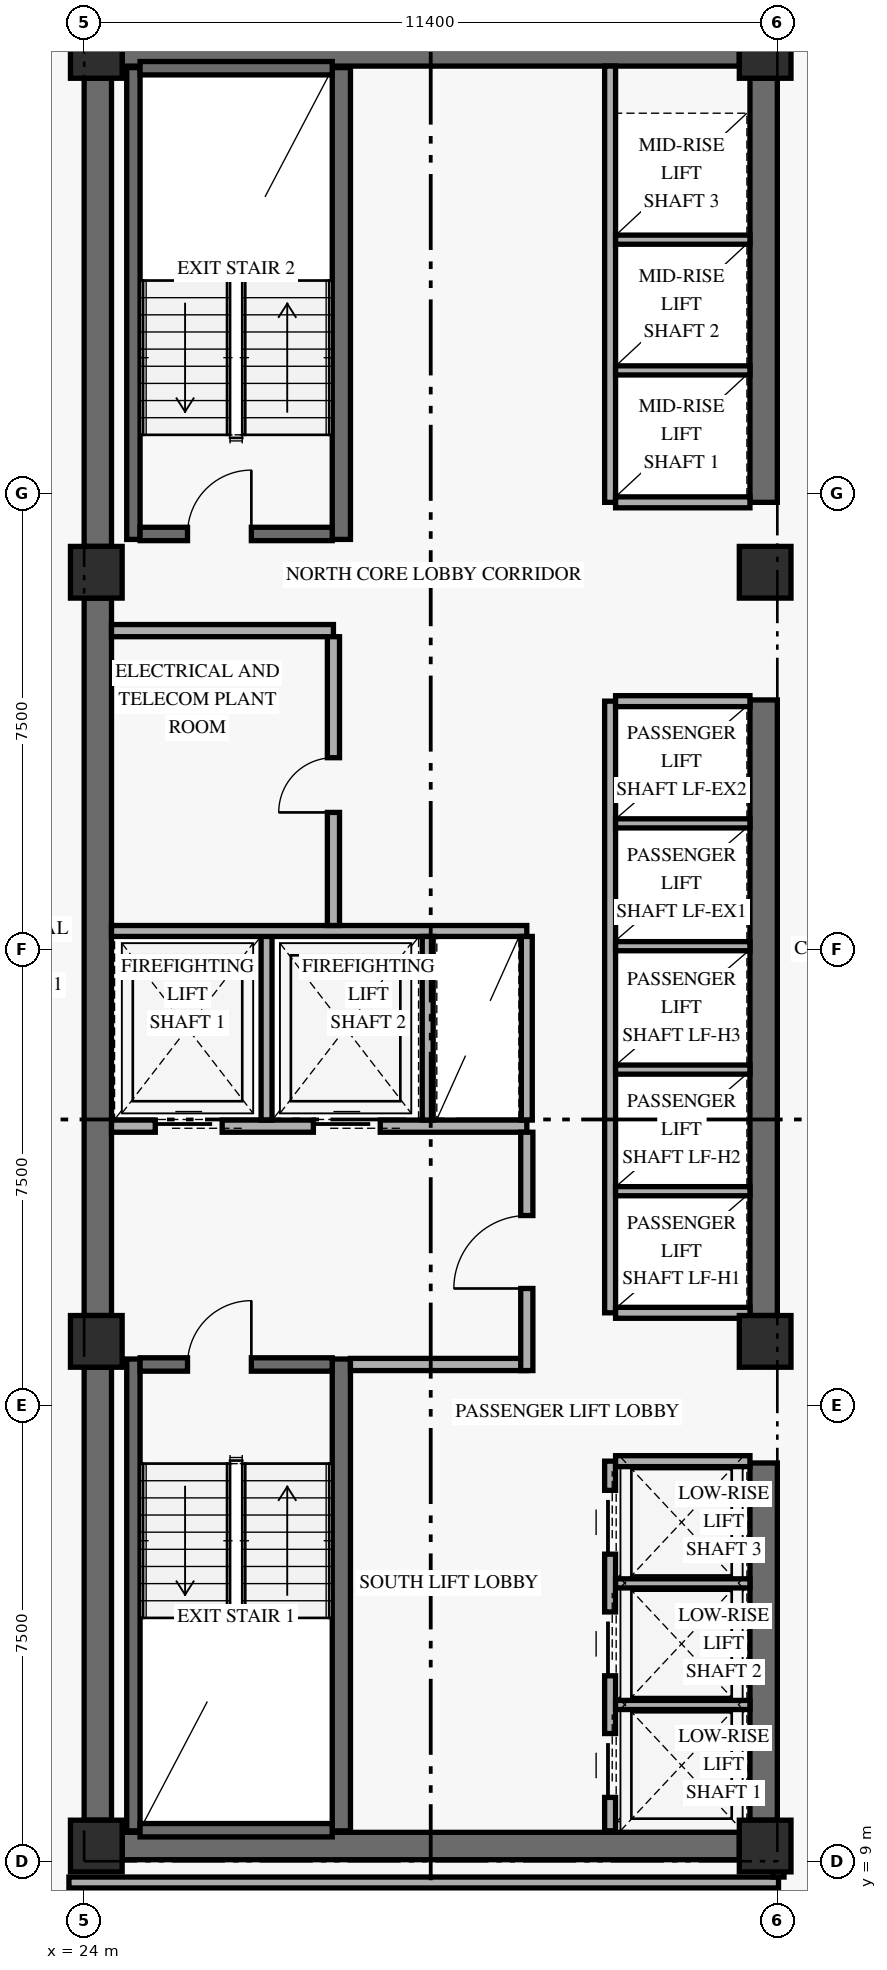
"""IFC4 building model, lengths in metres.
Left out: names, types, materials, properties, quantities, classifications, styles, units other than length and angle.
Written with IfcOpenShell. Run it as: python <this file> out.ifc"""

import sys

from ifc_helpers import new_model, si_unit, direction, frame, frame_2d, origin, origin_2d, place, context, subcontext, project, spatial, rectangle, extrude, element, fill, save


model = new_model("IFC4")
c1 = context("Model", 3, precision=1e-05, world=origin(), true_north=direction((0.0, 1.0)))
c2 = subcontext(c1, "Body", "Model", "MODEL_VIEW")
j1 = project(units=[si_unit("LENGTHUNIT", "METRE"), si_unit("PLANEANGLEUNIT", "RADIAN")], contexts=[c1])
p1 = place(None, origin())
s1 = spatial("IfcSite", under=j1, at=p1, CompositionType="ELEMENT")
p2 = place(p1, origin())
s2 = spatial("IfcBuilding", under=s1, at=p2, CompositionType="ELEMENT")
p3 = place(p2, frame((0.0, 0.0, 24.0)))
s3 = spatial("IfcBuildingStorey", under=s2, at=p3, CompositionType="ELEMENT", Elevation=24.0)
p4 = place(p3, frame((24.225, 9.675, 0.0), z_axis=(0.0, 0.0, 1.0), x_axis=(0.0, 1.0, 0.0)))
e1 = element("IfcWall", 1, at=p4, inside=s3, PredefinedType="SHEAR", context=c2, shape_type="SweptSolid", body=[
    extrude(rectangle(XDim=7.45, YDim=0.45, at=frame_2d((3.725, 0.0))), origin(), (0.0, 0.0, 1.0), 2.667),
])
p5 = place(p3, frame((24.225, 17.975, 0.0), z_axis=(0.0, 0.0, 1.0), x_axis=(0.0, 1.0, 0.0)))
e2 = element("IfcWall", 2, at=p5, inside=s3, PredefinedType="SHEAR", context=c2, shape_type="SweptSolid", body=[
    extrude(rectangle(XDim=11.8, YDim=0.45, at=frame_2d((5.9, 0.0))), origin(), (0.0, 0.0, 1.0), 2.667),
])
p6 = place(p3, frame((24.225, 30.625, 0.0), z_axis=(0.0, 0.0, 1.0), x_axis=(0.0, 1.0, 0.0)))
e3 = element("IfcWall", 3, at=p6, inside=s3, PredefinedType="SHEAR", context=c2, shape_type="SweptSolid", body=[
    extrude(rectangle(XDim=7.7, YDim=0.45, at=frame_2d((3.85, 0.0))), origin(), (0.0, 0.0, 1.0), 2.667),
])
p7 = place(p3, frame((35.175, 9.675, 0.0), z_axis=(0.0, 0.0, 1.0), x_axis=(0.0, 1.0, 0.0)))
e4 = element("IfcWall", 4, at=p7, inside=s3, PredefinedType="SHEAR", context=c2, shape_type="SweptSolid", body=[
    extrude(rectangle(XDim=5.875, YDim=0.45, at=frame_2d((2.938, 0.0))), origin(), (0.0, 0.0, 1.0), 2.667),
])
p8 = place(p3, frame((35.175, 17.975, 0.0), z_axis=(0.0, 0.0, 1.0), x_axis=(0.0, 1.0, 0.0)))
e5 = element("IfcWall", 5, at=p8, inside=s3, PredefinedType="SHEAR", context=c2, shape_type="SweptSolid", body=[
    extrude(rectangle(XDim=10.125, YDim=0.45, at=frame_2d((5.062, 0.0))), origin(), (0.0, 0.0, 1.0), 2.667),
])
p9 = place(p3, frame((35.175, 31.35, 0.0), z_axis=(0.0, 0.0, 1.0), x_axis=(0.0, 1.0, 0.0)))
e6 = element("IfcWall", 6, at=p9, inside=s3, PredefinedType="SHEAR", context=c2, shape_type="SweptSolid", body=[
    extrude(rectangle(XDim=6.975, YDim=0.45, at=frame_2d((3.487, 0.0))), origin(), (0.0, 0.0, 1.0), 2.667),
])
for number, where, z_axis, x_axis in (
    (7, (24.625, 9.25, 0.0), (0.0, 0.0, 1.0), (1.0, 0.0, 0.0)),
    (8, (24.625, 38.75, 0.0), (0.0, 0.0, 1.0), (1.0, 0.0, 0.0)),
):
    element("IfcWall", number, at=place(p3, frame(where, z_axis=z_axis, x_axis=x_axis)), inside=s3, PredefinedType="SHEAR", context=c2, shape_type="SweptSolid", body=[
        extrude(rectangle(XDim=10.15, YDim=0.45, at=frame_2d((5.075, 0.0))), origin(), (0.0, 0.0, 1.0), 3.36),
    ])
p10 = place(p3, frame((24.81, 9.5, 0.0), z_axis=(0.0, 0.0, 1.0), x_axis=(0.0, 1.0, 0.0)))
e9 = element("IfcWall", 9, at=p10, inside=s3, PredefinedType="SHEAR", context=c2, shape_type="SweptSolid", body=[
    extrude(rectangle(XDim=7.76, YDim=0.22, at=frame_2d((3.88, 0.0))), origin(), (0.0, 0.0, 1.0), 3.36),
])
p11 = place(p3, frame((28.23, 9.5, 0.0), z_axis=(0.0, 0.0, 1.0), x_axis=(0.0, 1.0, 0.0)))
e10 = element("IfcWall", 10, at=p11, inside=s3, PredefinedType="SHEAR", context=c2, shape_type="SweptSolid", body=[
    extrude(rectangle(XDim=7.76, YDim=0.3, at=frame_2d((3.88, 0.0))), origin(), (0.0, 0.0, 1.0), 3.36),
])
p12 = place(p3, frame((24.92, 9.51, 0.0), z_axis=(0.0, 0.0, 1.0), x_axis=(1.0, 0.0, 0.0)))
e11 = element("IfcWall", 11, at=p12, inside=s3, PredefinedType="SHEAR", context=c2, shape_type="SweptSolid", body=[
    extrude(rectangle(XDim=3.16, YDim=0.22, at=frame_2d((1.58, 0.0))), origin(), (0.0, 0.0, 1.0), 3.36),
])
p13 = place(p3, frame((24.92, 17.17, 0.0), z_axis=(0.0, 0.0, 1.0), x_axis=(1.0, 0.0, 0.0)))
e12 = element("IfcWall", 12, at=p13, inside=s3, PredefinedType="SHEAR", context=c2, shape_type="SweptSolid", body=[
    extrude(rectangle(XDim=3.16, YDim=0.22, at=frame_2d((1.58, 0.0))), origin(), (0.0, 0.0, 1.0), 3.36),
])
p14 = place(p13, frame((0.78, 0.0, 0.0)))
e13 = element("IfcOpeningElement", 13, at=p14, cuts=e12, PredefinedType="OPENING", context=c2, shape_type="SweptSolid", body=[
    extrude(rectangle(XDim=1.05, YDim=2.15, at=frame_2d((0.525, 1.075))), frame((0.0, 0.12, 0.0), z_axis=(0.0, -1.0, 0.0), x_axis=(1.0, 0.0, 0.0)), (0.0, 0.0, 1.0), 0.24),
])
p15 = place(p3, frame((24.81, 30.74, 0.0), z_axis=(0.0, 0.0, 1.0), x_axis=(0.0, 1.0, 0.0)))
e14 = element("IfcWall", 14, at=p15, inside=s3, PredefinedType="SHEAR", context=c2, shape_type="SweptSolid", body=[
    extrude(rectangle(XDim=7.76, YDim=0.22, at=frame_2d((3.88, 0.0))), origin(), (0.0, 0.0, 1.0), 3.36),
])
p16 = place(p3, frame((28.23, 30.74, 0.0), z_axis=(0.0, 0.0, 1.0), x_axis=(0.0, 1.0, 0.0)))
e15 = element("IfcWall", 15, at=p16, inside=s3, PredefinedType="SHEAR", context=c2, shape_type="SweptSolid", body=[
    extrude(rectangle(XDim=7.76, YDim=0.3, at=frame_2d((3.88, 0.0))), origin(), (0.0, 0.0, 1.0), 3.36),
])
p17 = place(p3, frame((24.92, 30.83, 0.0), z_axis=(0.0, 0.0, 1.0), x_axis=(1.0, 0.0, 0.0)))
e16 = element("IfcWall", 16, at=p17, inside=s3, PredefinedType="SHEAR", context=c2, shape_type="SweptSolid", body=[
    extrude(rectangle(XDim=3.16, YDim=0.22, at=frame_2d((1.58, 0.0))), origin(), (0.0, 0.0, 1.0), 3.36),
])
p18 = place(p17, frame((0.78, 0.0, 0.0)))
e17 = element("IfcOpeningElement", 17, at=p18, cuts=e16, PredefinedType="OPENING", context=c2, shape_type="SweptSolid", body=[
    extrude(rectangle(XDim=1.05, YDim=2.15, at=frame_2d((0.525, 1.075))), frame((0.0, 0.12, 0.0), z_axis=(0.0, -1.0, 0.0), x_axis=(1.0, 0.0, 0.0)), (0.0, 0.0, 1.0), 0.24),
])
p19 = place(p3, frame((24.92, 38.49, 0.0), z_axis=(0.0, 0.0, 1.0), x_axis=(1.0, 0.0, 0.0)))
e18 = element("IfcWall", 18, at=p19, inside=s3, PredefinedType="SHEAR", context=c2, shape_type="SweptSolid", body=[
    extrude(rectangle(XDim=3.16, YDim=0.22, at=frame_2d((1.58, 0.0))), origin(), (0.0, 0.0, 1.0), 3.36),
])
for number, where, z_axis, x_axis in (
    (19, (24.2, 9.25, 0.0), (0.0, 0.0, 1.0), (1.0, 0.0, 0.0)),
    (20, (24.2, 17.55, 0.0), (0.0, 0.0, 1.0), (1.0, 0.0, 0.0)),
    (21, (24.2, 30.2, 0.0), (0.0, 0.0, 1.0), (1.0, 0.0, 0.0)),
    (22, (24.2, 38.75, 0.0), (0.0, 0.0, 1.0), (1.0, 0.0, 0.0)),
    (23, (35.2, 9.25, 0.0), (0.0, 0.0, 1.0), (1.0, 0.0, 0.0)),
    (24, (35.2, 17.55, 0.0), (0.0, 0.0, 1.0), (1.0, 0.0, 0.0)),
    (25, (35.2, 30.2, 0.0), (0.0, 0.0, 1.0), (1.0, 0.0, 0.0)),
    (26, (35.2, 38.75, 0.0), (0.0, 0.0, 1.0), (1.0, 0.0, 0.0)),
):
    element("IfcColumn", number, at=place(p3, frame(where, z_axis=z_axis, x_axis=x_axis)), inside=s3, PredefinedType="COLUMN", context=c2, shape_type="SweptSolid", body=[
        extrude(rectangle(XDim=0.85, YDim=0.85, at=origin_2d()), origin(), (0.0, 0.0, 1.0), 3.6),
    ])
p20 = place(p3, frame((24.45, 21.09, 0.0), z_axis=(0.0, 0.0, 1.0), x_axis=(1.0, 0.0, 0.0)))
e27 = element("IfcWall", 27, at=p20, inside=s3, PredefinedType="STANDARD", context=c2, shape_type="SweptSolid", body=[
    extrude(rectangle(XDim=6.83, YDim=0.2, at=frame_2d((3.415, 0.0))), origin(), (0.0, 0.0, 1.0), 3.36),
])
p21 = place(p20, frame((0.72, 0.0, 0.0)))
e28 = element("IfcOpeningElement", 28, at=p21, cuts=e27, PredefinedType="OPENING", context=c2, shape_type="SweptSolid", body=[
    extrude(rectangle(XDim=1.1, YDim=2.2, at=frame_2d((0.55, 1.1))), frame((0.0, 0.11, 0.0), z_axis=(0.0, -1.0, 0.0), x_axis=(1.0, 0.0, 0.0)), (0.0, 0.0, 1.0), 0.22),
])
p22 = place(p20, frame((3.32, 0.0, 0.0)))
e29 = element("IfcOpeningElement", 29, at=p22, cuts=e27, PredefinedType="OPENING", context=c2, shape_type="SweptSolid", body=[
    extrude(rectangle(XDim=1.1, YDim=2.2, at=frame_2d((0.55, 1.1))), frame((0.0, 0.11, 0.0), z_axis=(0.0, -1.0, 0.0), x_axis=(1.0, 0.0, 0.0)), (0.0, 0.0, 1.0), 0.22),
])
p23 = place(p3, frame((28.38, 17.17, 0.0), z_axis=(0.0, 0.0, 1.0), x_axis=(1.0, 0.0, 0.0)))
e30 = element("IfcWall", 30, at=p23, inside=s3, PredefinedType="STANDARD", context=c2, shape_type="SweptSolid", body=[
    extrude(rectangle(XDim=2.9, YDim=0.2, at=frame_2d((1.45, 0.0))), origin(), (0.0, 0.0, 1.0), 3.36),
])
p24 = place(p3, frame((31.28, 17.07, 0.0), z_axis=(0.0, 0.0, 1.0), x_axis=(0.0, 1.0, 0.0)))
e31 = element("IfcWall", 31, at=p24, inside=s3, PredefinedType="STANDARD", context=c2, shape_type="SweptSolid", body=[
    extrude(rectangle(XDim=3.92, YDim=0.2, at=frame_2d((1.96, 0.0))), origin(), (0.0, 0.0, 1.0), 2.649),
])
p25 = place(p24, frame((1.35, 0.0, 0.0)))
e32 = element("IfcOpeningElement", 32, at=p25, cuts=e31, PredefinedType="OPENING", context=c2, shape_type="SweptSolid", body=[
    extrude(rectangle(XDim=1.2, YDim=2.15, at=frame_2d((0.6, 1.075))), frame((0.0, 0.11, 0.0), z_axis=(0.0, -1.0, 0.0), x_axis=(1.0, 0.0, 0.0)), (0.0, 0.0, 1.0), 0.22),
])
p26 = place(p3, frame((27.0, 21.19, 0.0), z_axis=(0.0, 0.0, 1.0), x_axis=(0.0, 1.0, 0.0)))
e33 = element("IfcWall", 33, at=p26, inside=s3, PredefinedType="STANDARD", context=c2, shape_type="SweptSolid", body=[
    extrude(rectangle(XDim=3.11, YDim=0.18, at=frame_2d((1.555, 0.0))), origin(), (0.0, 0.0, 1.0), 3.36),
])
p27 = place(p3, frame((24.45, 24.3, 0.0), z_axis=(0.0, 0.0, 1.0), x_axis=(1.0, 0.0, 0.0)))
e34 = element("IfcWall", 34, at=p27, inside=s3, PredefinedType="STANDARD", context=c2, shape_type="SweptSolid", body=[
    extrude(rectangle(XDim=6.83, YDim=0.18, at=frame_2d((3.415, 0.0))), origin(), (0.0, 0.0, 1.0), 3.36),
])
for number, where, z_axis, x_axis in (
    (35, (29.65, 21.19, 0.0), (0.0, 0.0, 1.0), (0.0, 1.0, 0.0)),
    (36, (31.28, 21.19, 0.0), (0.0, 0.0, 1.0), (0.0, 1.0, 0.0)),
):
    element("IfcWall", number, at=place(p3, frame(where, z_axis=z_axis, x_axis=x_axis)), inside=s3, PredefinedType="STANDARD", context=c2, shape_type="SweptSolid", body=[
        extrude(rectangle(XDim=3.02, YDim=0.18, at=frame_2d((1.51, 0.0))), origin(), (0.0, 0.0, 1.0), 3.36),
    ])
p28 = place(p3, frame((24.45, 29.24, 0.0), z_axis=(0.0, 0.0, 1.0), x_axis=(1.0, 0.0, 0.0)))
e37 = element("IfcWall", 37, at=p28, inside=s3, PredefinedType="STANDARD", context=c2, shape_type="SweptSolid", body=[
    extrude(rectangle(XDim=3.65, YDim=0.2, at=frame_2d((1.825, 0.0))), origin(), (0.0, 0.0, 1.0), 3.36),
])
p29 = place(p3, frame((28.1, 24.39, 0.0), z_axis=(0.0, 0.0, 1.0), x_axis=(0.0, 1.0, 0.0)))
e38 = element("IfcWall", 38, at=p29, inside=s3, PredefinedType="STANDARD", context=c2, shape_type="SweptSolid", body=[
    extrude(rectangle(XDim=4.75, YDim=0.2, at=frame_2d((2.375, 0.0))), origin(), (0.0, 0.0, 1.0), 3.36),
])
p30 = place(p29, frame((1.86, 0.0, 0.0)))
e39 = element("IfcOpeningElement", 39, at=p30, cuts=e38, PredefinedType="OPENING", context=c2, shape_type="SweptSolid", body=[
    extrude(rectangle(XDim=0.9, YDim=2.1, at=frame_2d((0.45, 1.05))), frame((0.0, 0.11, 0.0), z_axis=(0.0, -1.0, 0.0), x_axis=(1.0, 0.0, 0.0)), (0.0, 0.0, 1.0), 0.22),
])
p31 = place(p3, frame((32.65, 9.5, 0.0), z_axis=(0.0, 0.0, 1.0), x_axis=(0.0, 1.0, 0.0)))
e40 = element("IfcWall", 40, at=p31, inside=s3, PredefinedType="STANDARD", context=c2, shape_type="SweptSolid", body=[
    extrude(rectangle(XDim=6.08, YDim=0.18, at=frame_2d((3.04, 0.0))), origin(), (0.0, 0.0, 1.0), 3.36),
])
p32 = place(p31, frame((0.55, 0.0, 0.0)))
e41 = element("IfcOpeningElement", 41, at=p32, cuts=e40, PredefinedType="OPENING", context=c2, shape_type="SweptSolid", body=[
    extrude(rectangle(XDim=1.05, YDim=2.2, at=frame_2d((0.525, 1.1))), frame((0.0, 0.1, 0.0), z_axis=(0.0, -1.0, 0.0), x_axis=(1.0, 0.0, 0.0)), (0.0, 0.0, 1.0), 0.2),
])
p33 = place(p31, frame((2.55, 0.0, 0.0)))
e42 = element("IfcOpeningElement", 42, at=p33, cuts=e40, PredefinedType="OPENING", context=c2, shape_type="SweptSolid", body=[
    extrude(rectangle(XDim=1.05, YDim=2.2, at=frame_2d((0.525, 1.1))), frame((0.0, 0.1, 0.0), z_axis=(0.0, -1.0, 0.0), x_axis=(1.0, 0.0, 0.0)), (0.0, 0.0, 1.0), 0.2),
])
p34 = place(p31, frame((4.55, 0.0, 0.0)))
e43 = element("IfcOpeningElement", 43, at=p34, cuts=e40, PredefinedType="OPENING", context=c2, shape_type="SweptSolid", body=[
    extrude(rectangle(XDim=1.05, YDim=2.2, at=frame_2d((0.525, 1.1))), frame((0.0, 0.1, 0.0), z_axis=(0.0, -1.0, 0.0), x_axis=(1.0, 0.0, 0.0)), (0.0, 0.0, 1.0), 0.2),
])
p35 = place(p3, frame((32.74, 15.58, 0.0), z_axis=(0.0, 0.0, 1.0), x_axis=(1.0, 0.0, 0.0)))
e44 = element("IfcWall", 44, at=p35, inside=s3, PredefinedType="STANDARD", context=c2, shape_type="SweptSolid", body=[
    extrude(rectangle(XDim=2.21, YDim=0.18, at=frame_2d((1.105, 0.0))), origin(), (0.0, 0.0, 1.0), 3.36),
])
for number, where, z_axis, x_axis in (
    (45, (32.74, 11.57, 0.0), (0.0, 0.0, 1.0), (1.0, 0.0, 0.0)),
    (46, (32.74, 13.57, 0.0), (0.0, 0.0, 1.0), (1.0, 0.0, 0.0)),
):
    element("IfcWall", number, at=place(p3, frame(where, z_axis=z_axis, x_axis=x_axis)), inside=s3, PredefinedType="STANDARD", context=c2, shape_type="SweptSolid", body=[
        extrude(rectangle(XDim=2.21, YDim=0.15, at=frame_2d((1.105, 0.0))), origin(), (0.0, 0.0, 1.0), 3.36),
    ])
p36 = place(p3, frame((32.65, 18.02, 0.0), z_axis=(0.0, 0.0, 1.0), x_axis=(0.0, 1.0, 0.0)))
e47 = element("IfcWall", 47, at=p36, inside=s3, PredefinedType="STANDARD", context=c2, shape_type="SweptSolid", body=[
    extrude(rectangle(XDim=10.06, YDim=0.18, at=frame_2d((5.03, 0.0))), origin(), (0.0, 0.0, 1.0), 3.36),
])
for number, where, z_axis, x_axis in (
    (48, (32.74, 18.02, 0.0), (0.0, 0.0, 1.0), (1.0, 0.0, 0.0)),
    (49, (32.74, 28.08, 0.0), (0.0, 0.0, 1.0), (1.0, 0.0, 0.0)),
):
    element("IfcWall", number, at=place(p3, frame(where, z_axis=z_axis, x_axis=x_axis)), inside=s3, PredefinedType="STANDARD", context=c2, shape_type="SweptSolid", body=[
        extrude(rectangle(XDim=2.21, YDim=0.18, at=frame_2d((1.105, 0.0))), origin(), (0.0, 0.0, 1.0), 3.36),
    ])
for number, where, z_axis, x_axis in (
    (50, (32.74, 20.02, 0.0), (0.0, 0.0, 1.0), (1.0, 0.0, 0.0)),
    (51, (32.74, 22.02, 0.0), (0.0, 0.0, 1.0), (1.0, 0.0, 0.0)),
    (52, (32.74, 24.05, 0.0), (0.0, 0.0, 1.0), (1.0, 0.0, 0.0)),
    (53, (32.74, 26.07, 0.0), (0.0, 0.0, 1.0), (1.0, 0.0, 0.0)),
):
    element("IfcWall", number, at=place(p3, frame(where, z_axis=z_axis, x_axis=x_axis)), inside=s3, PredefinedType="STANDARD", context=c2, shape_type="SweptSolid", body=[
        extrude(rectangle(XDim=2.21, YDim=0.15, at=frame_2d((1.105, 0.0))), origin(), (0.0, 0.0, 1.0), 3.36),
    ])
p37 = place(p3, frame((32.65, 31.35, 0.0), z_axis=(0.0, 0.0, 1.0), x_axis=(0.0, 1.0, 0.0)))
e54 = element("IfcWall", 54, at=p37, inside=s3, PredefinedType="STANDARD", context=c2, shape_type="SweptSolid", body=[
    extrude(rectangle(XDim=7.175, YDim=0.18, at=frame_2d((3.587, 0.0))), origin(), (0.0, 0.0, 1.0), 3.36),
])
p38 = place(p3, frame((32.74, 31.35, 0.0), z_axis=(0.0, 0.0, 1.0), x_axis=(1.0, 0.0, 0.0)))
e55 = element("IfcWall", 55, at=p38, inside=s3, PredefinedType="STANDARD", context=c2, shape_type="SweptSolid", body=[
    extrude(rectangle(XDim=2.21, YDim=0.18, at=frame_2d((1.105, 0.0))), origin(), (0.0, 0.0, 1.0), 3.36),
])
for number, where, z_axis, x_axis in (
    (56, (32.74, 33.52, 0.0), (0.0, 0.0, 1.0), (1.0, 0.0, 0.0)),
    (57, (32.74, 35.67, 0.0), (0.0, 0.0, 1.0), (1.0, 0.0, 0.0)),
):
    element("IfcWall", number, at=place(p3, frame(where, z_axis=z_axis, x_axis=x_axis)), inside=s3, PredefinedType="STANDARD", context=c2, shape_type="SweptSolid", body=[
        extrude(rectangle(XDim=2.21, YDim=0.15, at=frame_2d((1.105, 0.0))), origin(), (0.0, 0.0, 1.0), 3.36),
    ])
p39 = place(p3, frame((23.75, 8.65, 0.0), z_axis=(0.0, 0.0, 1.0), x_axis=(1.0, 0.0, 0.0)))
e58 = element("IfcWall", 58, at=p39, inside=s3, PredefinedType="STANDARD", context=c2, shape_type="SweptSolid", body=[
    extrude(rectangle(XDim=11.67, YDim=0.18, at=frame_2d((5.835, 0.0))), origin(), (0.0, 0.0, 1.0), 2.649),
])
for number, where, z_axis, x_axis in (
    (59, (35.42, 8.74, 0.0), (0.0, 0.0, 1.0), (0.0, 1.0, 0.0)),
    (60, (35.42, 38.75, 0.0), (0.0, 0.0, 1.0), (0.0, 1.0, 0.0)),
):
    element("IfcWall", number, at=place(p3, frame(where, z_axis=z_axis, x_axis=x_axis)), inside=s3, PredefinedType="STANDARD", context=c2, shape_type="SweptSolid", body=[
        extrude(rectangle(XDim=0.51, YDim=0.18, at=frame_2d((0.255, 0.0))), origin(), (0.0, 0.0, 1.0), 3.36),
    ])
p40 = place(p14, frame((1.05, 0.0, 0.0), z_axis=(0.0, 0.0, 1.0), x_axis=(-1.0, 0.0, 0.0)))
e61 = element("IfcDoor", 61, at=p40, inside=s3, OperationType="SINGLE_SWING_LEFT", PredefinedType="DOOR", context=c2, shape_type="SweptSolid", body=[
    extrude(rectangle(XDim=1.05, YDim=2.15, at=frame_2d((0.525, 1.075))), frame((0.0, 0.025, 0.0), z_axis=(0.0, -1.0, 0.0), x_axis=(1.0, 0.0, 0.0)), (0.0, 0.0, 1.0), 0.05),
])
fill(e13, e61)
p41 = place(p18, origin())
e62 = element("IfcDoor", 62, at=p41, inside=s3, OperationType="SINGLE_SWING_RIGHT", PredefinedType="DOOR", context=c2, shape_type="SweptSolid", body=[
    extrude(rectangle(XDim=1.05, YDim=2.15, at=frame_2d((0.525, 1.075))), frame((0.0, 0.025, 0.0), z_axis=(0.0, -1.0, 0.0), x_axis=(1.0, 0.0, 0.0)), (0.0, 0.0, 1.0), 0.05),
])
fill(e17, e62)
p42 = place(p21, origin())
e63 = element("IfcDoor", 63, at=p42, inside=s3, OperationType="SLIDING_TO_LEFT", PredefinedType="DOOR", context=c2, shape_type="SweptSolid", body=[
    extrude(rectangle(XDim=1.1, YDim=2.2, at=frame_2d((0.55, 1.1))), frame((0.0, 0.025, 0.0), z_axis=(0.0, -1.0, 0.0), x_axis=(1.0, 0.0, 0.0)), (0.0, 0.0, 1.0), 0.05),
])
fill(e28, e63)
p43 = place(p22, origin())
e64 = element("IfcDoor", 64, at=p43, inside=s3, OperationType="SLIDING_TO_LEFT", PredefinedType="DOOR", context=c2, shape_type="SweptSolid", body=[
    extrude(rectangle(XDim=1.1, YDim=2.2, at=frame_2d((0.55, 1.1))), frame((0.0, 0.025, 0.0), z_axis=(0.0, -1.0, 0.0), x_axis=(1.0, 0.0, 0.0)), (0.0, 0.0, 1.0), 0.05),
])
fill(e29, e64)
p44 = place(p25, origin())
e65 = element("IfcDoor", 65, at=p44, inside=s3, OperationType="SINGLE_SWING_LEFT", PredefinedType="DOOR", context=c2, shape_type="SweptSolid", body=[
    extrude(rectangle(XDim=1.2, YDim=2.15, at=frame_2d((0.6, 1.075))), frame((0.0, 0.025, 0.0), z_axis=(0.0, -1.0, 0.0), x_axis=(1.0, 0.0, 0.0)), (0.0, 0.0, 1.0), 0.05),
])
fill(e32, e65)
p45 = place(p30, origin())
e66 = element("IfcDoor", 66, at=p45, inside=s3, OperationType="SINGLE_SWING_LEFT", PredefinedType="DOOR", context=c2, shape_type="SweptSolid", body=[
    extrude(rectangle(XDim=0.9, YDim=2.1, at=frame_2d((0.45, 1.05))), frame((0.0, 0.025, 0.0), z_axis=(0.0, -1.0, 0.0), x_axis=(1.0, 0.0, 0.0)), (0.0, 0.0, 1.0), 0.05),
])
fill(e39, e66)
p46 = place(p32, origin())
e67 = element("IfcDoor", 67, at=p46, inside=s3, OperationType="SLIDING_TO_LEFT", PredefinedType="DOOR", context=c2, shape_type="SweptSolid", body=[
    extrude(rectangle(XDim=1.05, YDim=2.2, at=frame_2d((0.525, 1.1))), frame((0.0, 0.025, 0.0), z_axis=(0.0, -1.0, 0.0), x_axis=(1.0, 0.0, 0.0)), (0.0, 0.0, 1.0), 0.05),
])
fill(e41, e67)
p47 = place(p33, origin())
e68 = element("IfcDoor", 68, at=p47, inside=s3, OperationType="SLIDING_TO_LEFT", PredefinedType="DOOR", context=c2, shape_type="SweptSolid", body=[
    extrude(rectangle(XDim=1.05, YDim=2.2, at=frame_2d((0.525, 1.1))), frame((0.0, 0.025, 0.0), z_axis=(0.0, -1.0, 0.0), x_axis=(1.0, 0.0, 0.0)), (0.0, 0.0, 1.0), 0.05),
])
fill(e42, e68)
p48 = place(p34, origin())
e69 = element("IfcDoor", 69, at=p48, inside=s3, OperationType="SLIDING_TO_LEFT", PredefinedType="DOOR", context=c2, shape_type="SweptSolid", body=[
    extrude(rectangle(XDim=1.05, YDim=2.2, at=frame_2d((0.525, 1.1))), frame((0.0, 0.025, 0.0), z_axis=(0.0, -1.0, 0.0), x_axis=(1.0, 0.0, 0.0)), (0.0, 0.0, 1.0), 0.05),
])
fill(e43, e69)
save(model, sys.argv[1])
